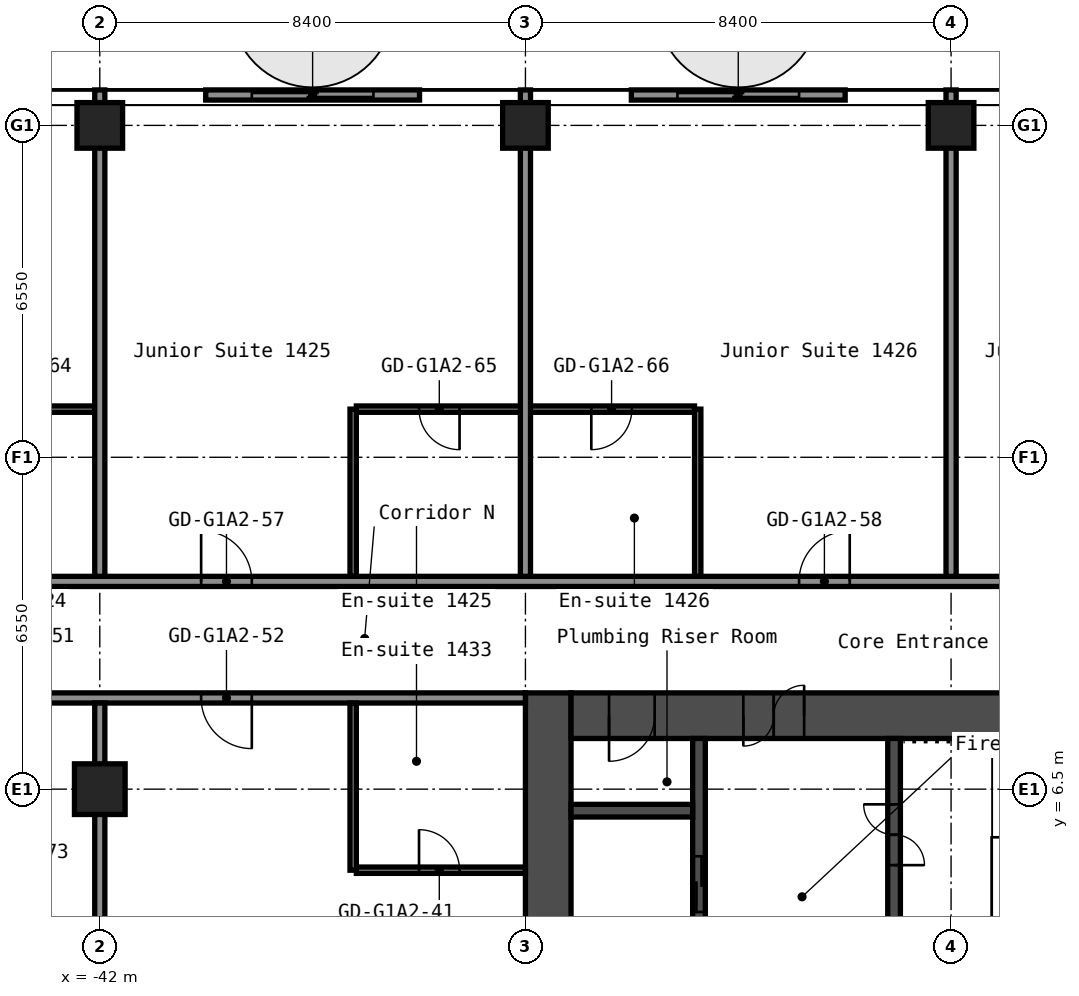
"""IFC4 building model, lengths in metres.
Left out: names, types, materials, properties, quantities, classifications, styles, units other than length and angle.
Written with IfcOpenShell. Run it as: python <this file> out.ifc"""

import sys

from ifc_helpers import new_model, si_unit, direction, frame, frame_2d, origin, origin_2d, place, context, subcontext, project, spatial, rectangle, hollow_rectangle, extrude, element, fill, save


model = new_model("IFC4")
c1 = context("Model", 3, precision=1e-05, world=origin(), true_north=direction((0.0, 1.0)))
c2 = subcontext(c1, "Body", "Model", "MODEL_VIEW")
j1 = project(units=[si_unit("LENGTHUNIT", "METRE"), si_unit("PLANEANGLEUNIT", "RADIAN")], contexts=[c1])
p1 = place(None, origin())
s1 = spatial("IfcSite", under=j1, at=p1, CompositionType="ELEMENT")
p2 = place(p1, origin())
s2 = spatial("IfcBuilding", under=s1, at=p2, CompositionType="ELEMENT")
p3 = place(p2, frame((0.0, 0.0, 51.8)))
s3 = spatial("IfcBuildingStorey", under=s2, at=p3, CompositionType="ELEMENT", Elevation=51.8)
p4 = place(p3, frame((-42.0, 6.5, 0.0), z_axis=(0.0, 0.0, 1.0), x_axis=(1.0, 0.0, 0.0)))
e1 = element("IfcColumn", 1, at=p4, inside=s3, PredefinedType="COLUMN", context=c2, shape_type="SweptSolid", body=[
    extrude(hollow_rectangle(XDim=1.0, YDim=1.0, WallThickness=0.04, at=origin_2d()), origin(), (0.0, 0.0, 1.0), 2.8),
])
for number, where, z_axis, x_axis in (
    (2, (-42.0, 19.6, 0.0), (0.0, 0.0, 1.0), (1.0, 0.0, 0.0)),
    (3, (-33.6, 19.6, 0.0), (0.0, 0.0, 1.0), (1.0, 0.0, 0.0)),
    (4, (-25.2, 19.6, 0.0), (0.0, 0.0, 1.0), (1.0, 0.0, 0.0)),
):
    element("IfcColumn", number, at=place(p3, frame(where, z_axis=z_axis, x_axis=x_axis)), inside=s3, PredefinedType="COLUMN", context=c2, shape_type="SweptSolid", body=[
        extrude(hollow_rectangle(XDim=0.9, YDim=0.9, WallThickness=0.036, at=origin_2d()), origin(), (0.0, 0.0, 1.0), 2.8),
    ])
p5 = place(p3, frame((-33.15, -8.4, 0.0), z_axis=(0.0, 0.0, 1.0), x_axis=(0.0, 1.0, 0.0)))
e5 = element("IfcWall", 5, at=p5, inside=s3, PredefinedType="SHEAR", context=c2, shape_type="SweptSolid", body=[
    extrude(rectangle(XDim=16.8, YDim=0.9, at=frame_2d((8.4, 0.0))), origin(), (0.0, 0.0, 1.0), 2.8),
])
p6 = place(p3, frame((-32.7, 7.95, 0.0), z_axis=(0.0, 0.0, 1.0), x_axis=(1.0, 0.0, 0.0)))
e6 = element("IfcWall", 6, at=p6, inside=s3, PredefinedType="SHEAR", context=c2, shape_type="SweptSolid", body=[
    extrude(rectangle(XDim=15.0, YDim=0.9, at=frame_2d((7.5, 0.0))), origin(), (0.0, 0.0, 1.0), 2.8),
])
p7 = place(p6, frame((3.4, 0.0, 0.0)))
e7 = element("IfcOpeningElement", 7, at=p7, cuts=e6, PredefinedType="OPENING", context=c2, shape_type="SweptSolid", body=[
    extrude(rectangle(XDim=1.2, YDim=2.1, at=frame_2d((0.6, 1.05))), frame((0.0, 0.46, 0.0), z_axis=(0.0, -1.0, 0.0), x_axis=(1.0, 0.0, 0.0)), (0.0, 0.0, 1.0), 0.92),
])
p8 = place(p6, frame((0.75, 0.0, 0.0)))
e8 = element("IfcOpeningElement", 8, at=p8, cuts=e6, PredefinedType="OPENING", context=c2, shape_type="SweptSolid", body=[
    extrude(rectangle(XDim=0.9, YDim=2.1, at=frame_2d((0.45, 1.05))), frame((0.0, 0.46, 0.0), z_axis=(0.0, -1.0, 0.0), x_axis=(1.0, 0.0, 0.0)), (0.0, 0.0, 1.0), 0.92),
])
p9 = place(p3, frame((-26.325, 3.75, 0.0), z_axis=(0.0, 0.0, 1.0), x_axis=(0.0, 1.0, 0.0)))
e9 = element("IfcWall", 9, at=p9, inside=s3, PredefinedType="SHEAR", context=c2, shape_type="SweptSolid", body=[
    extrude(rectangle(XDim=3.75, YDim=0.25, at=frame_2d((1.875, 0.0))), origin(), (0.0, 0.0, 1.0), 2.8),
])
p10 = place(p9, frame((1.25, 0.0, 0.0)))
e10 = element("IfcOpeningElement", 10, at=p10, cuts=e9, PredefinedType="OPENING", context=c2, shape_type="SweptSolid", body=[
    extrude(rectangle(XDim=1.2, YDim=2.1, at=frame_2d((0.6, 1.05))), frame((0.0, 0.135, 0.0), z_axis=(0.0, -1.0, 0.0), x_axis=(1.0, 0.0, 0.0)), (0.0, 0.0, 1.0), 0.27),
])
p11 = place(p3, frame((-30.175, 1.45, 0.0), z_axis=(0.0, 0.0, 1.0), x_axis=(0.0, 1.0, 0.0)))
e11 = element("IfcWall", 11, at=p11, inside=s3, PredefinedType="SHEAR", context=c2, shape_type="SweptSolid", body=[
    extrude(rectangle(XDim=6.05, YDim=0.25, at=frame_2d((3.025, 0.0))), origin(), (0.0, 0.0, 1.0), 2.8),
])
p12 = place(p11, frame((2.625, 0.0, 0.0)))
e12 = element("IfcOpeningElement", 12, at=p12, cuts=e11, PredefinedType="OPENING", context=c2, shape_type="SweptSolid", body=[
    extrude(rectangle(XDim=1.1, YDim=2.1, at=frame_2d((0.55, 1.05))), frame((0.0, 0.135, 0.0), z_axis=(0.0, -1.0, 0.0), x_axis=(1.0, 0.0, 0.0)), (0.0, 0.0, 1.0), 0.27),
])
p13 = place(p3, frame((-32.7, 6.075, 0.0), z_axis=(0.0, 0.0, 1.0), x_axis=(1.0, 0.0, 0.0)))
e13 = element("IfcWall", 13, at=p13, inside=s3, PredefinedType="SHEAR", context=c2, shape_type="SweptSolid", body=[
    extrude(rectangle(XDim=2.4, YDim=0.25, at=frame_2d((1.2, 0.0))), origin(), (0.0, 0.0, 1.0), 2.8),
])
p14 = place(p3, frame((-36.938, 4.9, 0.0), z_axis=(0.0, 0.0, 1.0), x_axis=(1.0, 0.0, 0.0)))
e14 = element("IfcWall", 14, at=p14, inside=s3, PredefinedType="PARTITIONING", context=c2, shape_type="SweptSolid", body=[
    extrude(rectangle(XDim=3.337, YDim=0.125, at=frame_2d((1.669, 0.0))), origin(), (0.0, 0.0, 1.0), 2.8),
])
p15 = place(p14, frame((1.238, 0.0, 0.0)))
e15 = element("IfcOpeningElement", 15, at=p15, cuts=e14, PredefinedType="OPENING", context=c2, shape_type="SweptSolid", body=[
    extrude(rectangle(XDim=0.8, YDim=2.1, at=frame_2d((0.4, 1.05))), frame((0.0, 0.073, 0.0), z_axis=(0.0, -1.0, 0.0), x_axis=(1.0, 0.0, 0.0)), (0.0, 0.0, 1.0), 0.145),
])
p16 = place(p3, frame((-48.6, 8.3, 0.0), z_axis=(0.0, 0.0, 1.0), x_axis=(1.0, 0.0, 0.0)))
e16 = element("IfcWall", 16, at=p16, inside=s3, PredefinedType="PARTITIONING", context=c2, shape_type="SweptSolid", body=[
    extrude(rectangle(XDim=15.0, YDim=0.2, at=frame_2d((7.5, 0.0))), origin(), (0.0, 0.0, 1.0), 2.8),
])
p17 = place(p16, frame((4.45, 0.0, 0.0)))
e17 = element("IfcOpeningElement", 17, at=p17, cuts=e16, PredefinedType="OPENING", context=c2, shape_type="SweptSolid", body=[
    extrude(rectangle(XDim=1.0, YDim=2.1, at=frame_2d((0.5, 1.05))), frame((0.0, 0.11, 0.0), z_axis=(0.0, -1.0, 0.0), x_axis=(1.0, 0.0, 0.0)), (0.0, 0.0, 1.0), 0.22),
])
p18 = place(p16, frame((8.6, 0.0, 0.0)))
e18 = element("IfcOpeningElement", 18, at=p18, cuts=e16, PredefinedType="OPENING", context=c2, shape_type="SweptSolid", body=[
    extrude(rectangle(XDim=1.0, YDim=2.1, at=frame_2d((0.5, 1.05))), frame((0.0, 0.11, 0.0), z_axis=(0.0, -1.0, 0.0), x_axis=(1.0, 0.0, 0.0)), (0.0, 0.0, 1.0), 0.22),
])
p19 = place(p3, frame((-51.1, 10.6, 0.0), z_axis=(0.0, 0.0, 1.0), x_axis=(1.0, 0.0, 0.0)))
e19 = element("IfcWall", 19, at=p19, inside=s3, PredefinedType="PARTITIONING", context=c2, shape_type="SweptSolid", body=[
    extrude(rectangle(XDim=34.3, YDim=0.2, at=frame_2d((17.15, 0.0))), origin(), (0.0, 0.0, 1.0), 2.8),
])
p20 = place(p19, frame((2.5, 0.0, 0.0)))
e20 = element("IfcOpeningElement", 20, at=p20, cuts=e19, PredefinedType="OPENING", context=c2, shape_type="SweptSolid", body=[
    extrude(rectangle(XDim=1.0, YDim=2.1, at=frame_2d((0.5, 1.05))), frame((0.0, 0.11, 0.0), z_axis=(0.0, -1.0, 0.0), x_axis=(1.0, 0.0, 0.0)), (0.0, 0.0, 1.0), 0.22),
])
p21 = place(p19, frame((11.1, 0.0, 0.0)))
e21 = element("IfcOpeningElement", 21, at=p21, cuts=e19, PredefinedType="OPENING", context=c2, shape_type="SweptSolid", body=[
    extrude(rectangle(XDim=1.0, YDim=2.1, at=frame_2d((0.5, 1.05))), frame((0.0, 0.11, 0.0), z_axis=(0.0, -1.0, 0.0), x_axis=(1.0, 0.0, 0.0)), (0.0, 0.0, 1.0), 0.22),
])
p22 = place(p19, frame((22.9, 0.0, 0.0)))
e22 = element("IfcOpeningElement", 22, at=p22, cuts=e19, PredefinedType="OPENING", context=c2, shape_type="SweptSolid", body=[
    extrude(rectangle(XDim=1.0, YDim=2.1, at=frame_2d((0.5, 1.05))), frame((0.0, 0.11, 0.0), z_axis=(0.0, -1.0, 0.0), x_axis=(1.0, 0.0, 0.0)), (0.0, 0.0, 1.0), 0.22),
])
p23 = place(p19, frame((27.9, 0.0, 0.0)))
e23 = element("IfcOpeningElement", 23, at=p23, cuts=e19, PredefinedType="OPENING", context=c2, shape_type="SweptSolid", body=[
    extrude(rectangle(XDim=1.0, YDim=2.1, at=frame_2d((0.5, 1.05))), frame((0.0, 0.11, 0.0), z_axis=(0.0, -1.0, 0.0), x_axis=(1.0, 0.0, 0.0)), (0.0, 0.0, 1.0), 0.22),
])
p24 = place(p3, frame((-45.337, 14.0, 0.0), z_axis=(0.0, 0.0, 1.0), x_axis=(1.0, 0.0, 0.0)))
e24 = element("IfcWall", 24, at=p24, inside=s3, PredefinedType="PARTITIONING", context=c2, shape_type="SweptSolid", body=[
    extrude(rectangle(XDim=3.237, YDim=0.125, at=frame_2d((1.619, 0.0))), origin(), (0.0, 0.0, 1.0), 2.8),
])
p25 = place(p24, frame((1.238, 0.0, 0.0)))
e25 = element("IfcOpeningElement", 25, at=p25, cuts=e24, PredefinedType="OPENING", context=c2, shape_type="SweptSolid", body=[
    extrude(rectangle(XDim=0.8, YDim=2.1, at=frame_2d((0.4, 1.05))), frame((0.0, 0.073, 0.0), z_axis=(0.0, -1.0, 0.0), x_axis=(1.0, 0.0, 0.0)), (0.0, 0.0, 1.0), 0.145),
])
p26 = place(p3, frame((-36.938, 14.0, 0.0), z_axis=(0.0, 0.0, 1.0), x_axis=(1.0, 0.0, 0.0)))
e26 = element("IfcWall", 26, at=p26, inside=s3, PredefinedType="PARTITIONING", context=c2, shape_type="SweptSolid", body=[
    extrude(rectangle(XDim=6.675, YDim=0.125, at=frame_2d((3.337, 0.0))), origin(), (0.0, 0.0, 1.0), 2.8),
])
p27 = place(p26, frame((1.238, 0.0, 0.0)))
e27 = element("IfcOpeningElement", 27, at=p27, cuts=e26, PredefinedType="OPENING", context=c2, shape_type="SweptSolid", body=[
    extrude(rectangle(XDim=0.8, YDim=2.1, at=frame_2d((0.4, 1.05))), frame((0.0, 0.073, 0.0), z_axis=(0.0, -1.0, 0.0), x_axis=(1.0, 0.0, 0.0)), (0.0, 0.0, 1.0), 0.145),
])
p28 = place(p26, frame((4.637, 0.0, 0.0)))
e28 = element("IfcOpeningElement", 28, at=p28, cuts=e26, PredefinedType="OPENING", context=c2, shape_type="SweptSolid", body=[
    extrude(rectangle(XDim=0.8, YDim=2.1, at=frame_2d((0.4, 1.05))), frame((0.0, 0.073, 0.0), z_axis=(0.0, -1.0, 0.0), x_axis=(1.0, 0.0, 0.0)), (0.0, 0.0, 1.0), 0.145),
])
p29 = place(p3, frame((-42.0, -8.2, 0.0), z_axis=(0.0, 0.0, 1.0), x_axis=(0.0, 1.0, 0.0)))
e29 = element("IfcWall", 29, at=p29, inside=s3, PredefinedType="PARTITIONING", context=c2, shape_type="SweptSolid", body=[
    extrude(rectangle(XDim=16.4, YDim=0.2, at=frame_2d((8.2, 0.0))), origin(), (0.0, 0.0, 1.0), 2.8),
])
p30 = place(p3, frame((-42.0, 10.7, 0.0), z_axis=(0.0, 0.0, 1.0), x_axis=(0.0, 1.0, 0.0)))
e30 = element("IfcWall", 30, at=p30, inside=s3, PredefinedType="PARTITIONING", context=c2, shape_type="SweptSolid", body=[
    extrude(rectangle(XDim=9.6, YDim=0.2, at=frame_2d((4.8, 0.0))), origin(), (0.0, 0.0, 1.0), 2.8),
])
for number, where, z_axis, x_axis in (
    (31, (-37.0, 4.9, 0.0), (0.0, 0.0, 1.0), (0.0, 1.0, 0.0)),
    (32, (-37.0, 10.7, 0.0), (0.0, 0.0, 1.0), (0.0, 1.0, 0.0)),
):
    element("IfcWall", number, at=place(p3, frame(where, z_axis=z_axis, x_axis=x_axis)), inside=s3, PredefinedType="PARTITIONING", context=c2, shape_type="SweptSolid", body=[
        extrude(rectangle(XDim=3.3, YDim=0.125, at=frame_2d((1.65, 0.0))), origin(), (0.0, 0.0, 1.0), 2.8),
    ])
p31 = place(p3, frame((-33.6, 10.7, 0.0), z_axis=(0.0, 0.0, 1.0), x_axis=(0.0, 1.0, 0.0)))
e33 = element("IfcWall", 33, at=p31, inside=s3, PredefinedType="PARTITIONING", context=c2, shape_type="SweptSolid", body=[
    extrude(rectangle(XDim=9.6, YDim=0.2, at=frame_2d((4.8, 0.0))), origin(), (0.0, 0.0, 1.0), 2.8),
])
p32 = place(p3, frame((-30.2, 10.7, 0.0), z_axis=(0.0, 0.0, 1.0), x_axis=(0.0, 1.0, 0.0)))
e34 = element("IfcWall", 34, at=p32, inside=s3, PredefinedType="PARTITIONING", context=c2, shape_type="SweptSolid", body=[
    extrude(rectangle(XDim=3.3, YDim=0.125, at=frame_2d((1.65, 0.0))), origin(), (0.0, 0.0, 1.0), 2.8),
])
p33 = place(p3, frame((-25.2, 10.7, 0.0), z_axis=(0.0, 0.0, 1.0), x_axis=(0.0, 1.0, 0.0)))
e35 = element("IfcWall", 35, at=p33, inside=s3, PredefinedType="PARTITIONING", context=c2, shape_type="SweptSolid", body=[
    extrude(rectangle(XDim=9.6, YDim=0.2, at=frame_2d((4.8, 0.0))), origin(), (0.0, 0.0, 1.0), 2.8),
])
p34 = place(p3, frame((-27.29, 20.2, 0.0), z_axis=(0.0, 0.0, 1.0), x_axis=(-1.0, 0.0, 0.0)))
p35 = place(p34, frame((0.91, 0.0, 0.0)))
p36 = place(p35, frame((2.4, 0.0, 0.0), z_axis=(0.0, 0.0, 1.0), x_axis=(-1.0, 0.0, 0.0)))
e36 = element("IfcDoor", 36, at=p36, inside=s3, OperationType="SLIDING_TO_LEFT", PredefinedType="DOOR", context=c2, shape_type="SweptSolid", body=[
    extrude(rectangle(XDim=2.4, YDim=2.2, at=frame_2d((1.2, 1.1))), frame((0.0, 0.025, 0.0), z_axis=(0.0, -1.0, 0.0), x_axis=(1.0, 0.0, 0.0)), (0.0, 0.0, 1.0), 0.05),
])
p37 = place(p3, frame((-35.69, 20.2, 0.0), z_axis=(0.0, 0.0, 1.0), x_axis=(-1.0, 0.0, 0.0)))
p38 = place(p37, frame((0.91, 0.0, 0.0)))
p39 = place(p38, frame((2.4, 0.0, 0.0), z_axis=(0.0, 0.0, 1.0), x_axis=(-1.0, 0.0, 0.0)))
e37 = element("IfcDoor", 37, at=p39, inside=s3, OperationType="SLIDING_TO_LEFT", PredefinedType="DOOR", context=c2, shape_type="SweptSolid", body=[
    extrude(rectangle(XDim=2.4, YDim=2.2, at=frame_2d((1.2, 1.1))), frame((0.0, 0.025, 0.0), z_axis=(0.0, -1.0, 0.0), x_axis=(1.0, 0.0, 0.0)), (0.0, 0.0, 1.0), 0.05),
])
p40 = place(p7, origin())
e38 = element("IfcDoor", 38, at=p40, inside=s3, OperationType="DOUBLE_DOOR_SINGLE_SWING", PredefinedType="DOOR", context=c2, shape_type="SweptSolid", body=[
    extrude(rectangle(XDim=1.2, YDim=2.1, at=frame_2d((0.6, 1.05))), frame((0.0, 0.025, 0.0), z_axis=(0.0, -1.0, 0.0), x_axis=(1.0, 0.0, 0.0)), (0.0, 0.0, 1.0), 0.05),
])
fill(e7, e38)
p41 = place(p8, origin())
e39 = element("IfcDoor", 39, at=p41, inside=s3, OperationType="SINGLE_SWING_LEFT", PredefinedType="DOOR", context=c2, shape_type="SweptSolid", body=[
    extrude(rectangle(XDim=0.9, YDim=2.1, at=frame_2d((0.45, 1.05))), frame((0.0, 0.025, 0.0), z_axis=(0.0, -1.0, 0.0), x_axis=(1.0, 0.0, 0.0)), (0.0, 0.0, 1.0), 0.05),
])
fill(e8, e39)
p42 = place(p10, origin())
e40 = element("IfcDoor", 40, at=p42, inside=s3, OperationType="DOUBLE_DOOR_SINGLE_SWING", PredefinedType="DOOR", context=c2, shape_type="SweptSolid", body=[
    extrude(rectangle(XDim=1.2, YDim=2.1, at=frame_2d((0.6, 1.05))), frame((0.0, 0.025, 0.0), z_axis=(0.0, -1.0, 0.0), x_axis=(1.0, 0.0, 0.0)), (0.0, 0.0, 1.0), 0.05),
])
fill(e10, e40)
p43 = place(p12, origin())
e41 = element("IfcDoor", 41, at=p43, inside=s3, OperationType="DOUBLE_DOOR_SLIDING", PredefinedType="DOOR", context=c2, shape_type="SweptSolid", body=[
    extrude(rectangle(XDim=1.1, YDim=2.1, at=frame_2d((0.55, 1.05))), frame((0.0, 0.025, 0.0), z_axis=(0.0, -1.0, 0.0), x_axis=(1.0, 0.0, 0.0)), (0.0, 0.0, 1.0), 0.05),
])
fill(e12, e41)
p44 = place(p15, origin())
e42 = element("IfcDoor", 42, at=p44, inside=s3, OperationType="SINGLE_SWING_RIGHT", PredefinedType="DOOR", context=c2, shape_type="SweptSolid", body=[
    extrude(rectangle(XDim=0.8, YDim=2.1, at=frame_2d((0.4, 1.05))), frame((0.0, 0.025, 0.0), z_axis=(0.0, -1.0, 0.0), x_axis=(1.0, 0.0, 0.0)), (0.0, 0.0, 1.0), 0.05),
])
fill(e15, e42)
p45 = place(p18, origin())
e43 = element("IfcDoor", 43, at=p45, inside=s3, OperationType="SINGLE_SWING_RIGHT", PredefinedType="DOOR", context=c2, shape_type="SweptSolid", body=[
    extrude(rectangle(XDim=1.0, YDim=2.1, at=frame_2d((0.5, 1.05))), frame((0.0, 0.025, 0.0), z_axis=(0.0, -1.0, 0.0), x_axis=(1.0, 0.0, 0.0)), (0.0, 0.0, 1.0), 0.05),
])
fill(e18, e43)
p46 = place(p21, origin())
e44 = element("IfcDoor", 44, at=p46, inside=s3, OperationType="SINGLE_SWING_RIGHT", PredefinedType="DOOR", context=c2, shape_type="SweptSolid", body=[
    extrude(rectangle(XDim=1.0, YDim=2.1, at=frame_2d((0.5, 1.05))), frame((0.0, 0.025, 0.0), z_axis=(0.0, -1.0, 0.0), x_axis=(1.0, 0.0, 0.0)), (0.0, 0.0, 1.0), 0.05),
])
fill(e21, e44)
p47 = place(p22, origin())
e45 = element("IfcDoor", 45, at=p47, inside=s3, OperationType="SINGLE_SWING_LEFT", PredefinedType="DOOR", context=c2, shape_type="SweptSolid", body=[
    extrude(rectangle(XDim=1.0, YDim=2.1, at=frame_2d((0.5, 1.05))), frame((0.0, 0.025, 0.0), z_axis=(0.0, -1.0, 0.0), x_axis=(1.0, 0.0, 0.0)), (0.0, 0.0, 1.0), 0.05),
])
fill(e22, e45)
p48 = place(p27, origin())
e46 = element("IfcDoor", 46, at=p48, inside=s3, OperationType="SINGLE_SWING_RIGHT", PredefinedType="DOOR", context=c2, shape_type="SweptSolid", body=[
    extrude(rectangle(XDim=0.8, YDim=2.1, at=frame_2d((0.4, 1.05))), frame((0.0, 0.025, 0.0), z_axis=(0.0, -1.0, 0.0), x_axis=(1.0, 0.0, 0.0)), (0.0, 0.0, 1.0), 0.05),
])
fill(e27, e46)
p49 = place(p28, origin())
e47 = element("IfcDoor", 47, at=p49, inside=s3, OperationType="SINGLE_SWING_LEFT", PredefinedType="DOOR", context=c2, shape_type="SweptSolid", body=[
    extrude(rectangle(XDim=0.8, YDim=2.1, at=frame_2d((0.4, 1.05))), frame((0.0, 0.025, 0.0), z_axis=(0.0, -1.0, 0.0), x_axis=(1.0, 0.0, 0.0)), (0.0, 0.0, 1.0), 0.05),
])
fill(e28, e47)
save(model, sys.argv[1])
